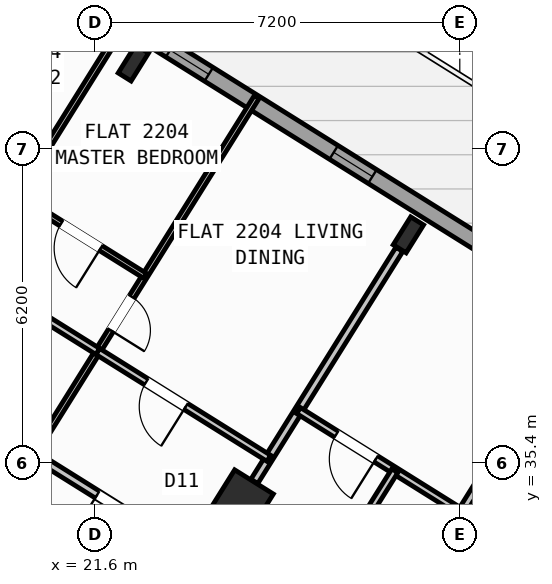
"""IFC4 building model, lengths in metres.
Left out: names, types, materials, properties, quantities, classifications, styles, units other than length and angle.
Written with IfcOpenShell. Run it as: python <this file> out.ifc"""

import sys

from ifc_helpers import new_model, si_unit, direction, frame, frame_2d, origin, origin_2d, place, context, subcontext, project, spatial, rectangle, hollow_rectangle, i_section, extrude, source, transform, mapped, element, fill, save


model = new_model("IFC4")
c1 = context("Model", 3, precision=1e-05, world=origin(), true_north=direction((0.0, 1.0)))
c2 = subcontext(c1, "Body", "Model", "MODEL_VIEW")
j1 = project(units=[si_unit("LENGTHUNIT", "METRE"), si_unit("PLANEANGLEUNIT", "RADIAN")], contexts=[c1])
p1 = place(None, origin())
s1 = spatial("IfcSite", under=j1, at=p1, CompositionType="ELEMENT")
p2 = place(p1, origin())
s2 = spatial("IfcBuilding", under=s1, at=p2, CompositionType="ELEMENT")
p3 = place(p2, frame((0.0, 0.0, 90.0)))
s3 = spatial("IfcBuildingStorey", under=s2, at=p3, CompositionType="ELEMENT", Elevation=90.0)
m1 = source(origin(), c2, "Body", "SweptSolid", [
    extrude(i_section(OverallWidth=0.3, OverallDepth=0.65, WebThickness=0.016, FlangeThickness=0.031, at=origin_2d()), origin(), (0.0, 0.0, 1.0), 3.6),
])
p4 = place(p3, frame((27.786, 39.901, 0.0), z_axis=(0.0, 0.0, 1.0), x_axis=(-0.848048096156, 0.529919264233, 0.0)))
e1 = element("IfcColumn", 1, at=p4, inside=s3, PredefinedType="COLUMN", context=c2, shape_type="MappedRepresentation", body=[
    mapped(m1, transform((0.0, 0.0, 0.0), scale=1.0)),
])
m2 = source(origin(), c2, "Body", "SweptSolid", [
    extrude(hollow_rectangle(XDim=0.9, YDim=0.9, WallThickness=0.036, at=origin_2d()), origin(), (0.0, 0.0, 1.0), 3.6),
])
p5 = place(p3, frame((24.5, 34.643, 0.0), z_axis=(0.0, 0.0, 1.0), x_axis=(-0.848048096156, 0.529919264233, 0.0)))
e2 = element("IfcColumn", 2, at=p5, inside=s3, PredefinedType="COLUMN", context=c2, shape_type="MappedRepresentation", body=[
    mapped(m2, transform((0.0, 0.0, 0.0), scale=1.0)),
])
p6 = place(p3, frame((22.358, 43.292, 0.0), z_axis=(0.0, 0.0, 1.0), x_axis=(-0.848048096156, 0.529919264233, 0.0)))
e3 = element("IfcColumn", 3, at=p6, inside=s3, PredefinedType="COLUMN", context=c2, shape_type="MappedRepresentation", body=[
    mapped(m1, transform((0.0, 0.0, 0.0), scale=1.0)),
])
p7 = place(p3, frame((17.424, 47.083, 0.0), z_axis=(0.0, 0.0, 1.0), x_axis=(0.848049927979, -0.529916332693, 0.0)))
e4 = element("IfcWall", 4, at=p7, inside=s3, PredefinedType="STANDARD", context=c2, shape_type="SweptSolid", body=[
    extrude(rectangle(XDim=29.223, YDim=0.32, at=frame_2d((14.612, 0.0))), origin(), (0.0, 0.0, 1.0), 3.35),
])
p8 = place(p7, frame((15.02, 0.0, 0.0)))
e5 = element("IfcOpeningElement", 5, at=p8, cuts=e4, PredefinedType="OPENING", context=c2, shape_type="SweptSolid", body=[
    extrude(rectangle(XDim=1.05, YDim=2.15, at=frame_2d((0.525, 1.075))), frame((0.0, 0.17, 0.0), z_axis=(0.0, -1.0, 0.0), x_axis=(1.0, 0.0, 0.0)), (0.0, 0.0, 1.0), 0.34),
])
p9 = place(p7, frame((20.869, 0.0, 0.8)))
e6 = element("IfcOpeningElement", 6, at=p9, cuts=e4, PredefinedType="OPENING", context=c2, shape_type="SweptSolid", body=[
    extrude(rectangle(XDim=2.1, YDim=1.55, at=frame_2d((1.05, 0.775))), frame((0.0, 0.17, 0.0), z_axis=(0.0, -1.0, 0.0), x_axis=(1.0, 0.0, 0.0)), (0.0, 0.0, 1.0), 0.34),
])
p10 = place(p7, frame((25.438, 0.0, 0.8)))
e7 = element("IfcOpeningElement", 7, at=p10, cuts=e4, PredefinedType="OPENING", context=c2, shape_type="SweptSolid", body=[
    extrude(rectangle(XDim=2.1, YDim=1.55, at=frame_2d((1.05, 0.775))), frame((0.0, 0.17, 0.0), z_axis=(0.0, -1.0, 0.0), x_axis=(1.0, 0.0, 0.0)), (0.0, 0.0, 1.0), 0.34),
])
p11 = place(p7, frame((10.481, 0.0, 1.0)))
e8 = element("IfcOpeningElement", 8, at=p11, cuts=e4, PredefinedType="OPENING", context=c2, shape_type="SweptSolid", body=[
    extrude(rectangle(XDim=0.9, YDim=1.25, at=frame_2d((0.45, 0.625))), frame((0.0, 0.17, 0.0), z_axis=(0.0, -1.0, 0.0), x_axis=(1.0, 0.0, 0.0)), (0.0, 0.0, 1.0), 0.34),
])
p12 = place(p7, frame((6.674, 0.0, 1.0)))
e9 = element("IfcOpeningElement", 9, at=p12, cuts=e4, PredefinedType="OPENING", context=c2, shape_type="SweptSolid", body=[
    extrude(rectangle(XDim=0.9, YDim=1.25, at=frame_2d((0.45, 0.625))), frame((0.0, 0.17, 0.0), z_axis=(0.0, -1.0, 0.0), x_axis=(1.0, 0.0, 0.0)), (0.0, 0.0, 1.0), 0.34),
])
p13 = place(p7, frame((3.694, 0.0, 1.0)))
e10 = element("IfcOpeningElement", 10, at=p13, cuts=e4, PredefinedType="OPENING", context=c2, shape_type="SweptSolid", body=[
    extrude(rectangle(XDim=0.9, YDim=1.25, at=frame_2d((0.45, 0.625))), frame((0.0, 0.17, 0.0), z_axis=(0.0, -1.0, 0.0), x_axis=(1.0, 0.0, 0.0)), (0.0, 0.0, 1.0), 0.34),
])
p14 = place(p3, frame((31.239, 38.274, 0.0), z_axis=(0.0, 0.0, 1.0), x_axis=(-0.529928058306, -0.848042600947, 0.0)))
e11 = element("IfcWall", 11, at=p14, inside=s3, PredefinedType="PARTITIONING", context=c2, shape_type="SweptSolid", body=[
    extrude(rectangle(XDim=8.05, YDim=0.16, at=frame_2d((4.025, 0.0))), origin(), (0.0, 0.0, 1.0), 3.34),
])
p15 = place(p3, frame((26.973, 31.447, 0.0), z_axis=(0.0, 0.0, 1.0), x_axis=(-0.848048310262, 0.529918921593, 0.0)))
e12 = element("IfcWall", 12, at=p15, inside=s3, PredefinedType="PARTITIONING", context=c2, shape_type="SweptSolid", body=[
    extrude(rectangle(XDim=16.73, YDim=0.16, at=frame_2d((8.365, 0.0))), origin(), (0.0, 0.0, 1.0), 3.34),
])
p16 = place(p15, frame((2.22, 0.0, 0.0)))
e13 = element("IfcOpeningElement", 13, at=p16, cuts=e12, PredefinedType="OPENING", context=c2, shape_type="SweptSolid", body=[
    extrude(rectangle(XDim=0.86, YDim=2.05, at=frame_2d((0.43, 1.025))), frame((0.0, 0.09, 0.0), z_axis=(0.0, -1.0, 0.0), x_axis=(1.0, 0.0, 0.0)), (0.0, 0.0, 1.0), 0.18),
])
p17 = place(p15, frame((5.28, 0.0, 0.0)))
e14 = element("IfcOpeningElement", 14, at=p17, cuts=e12, PredefinedType="OPENING", context=c2, shape_type="SweptSolid", body=[
    extrude(rectangle(XDim=1.0, YDim=2.1, at=frame_2d((0.5, 1.05))), frame((0.0, 0.09, 0.0), z_axis=(0.0, -1.0, 0.0), x_axis=(1.0, 0.0, 0.0)), (0.0, 0.0, 1.0), 0.18),
])
p18 = place(p3, frame((25.807, 29.582, 0.0), z_axis=(0.0, 0.0, 1.0), x_axis=(-0.848052408131, 0.529912363569, 0.0)))
e15 = element("IfcWall", 15, at=p18, inside=s3, PredefinedType="PARTITIONING", context=c2, shape_type="SweptSolid", body=[
    extrude(rectangle(XDim=16.73, YDim=0.16, at=frame_2d((8.365, 0.0))), origin(), (0.0, 0.0, 1.0), 3.34),
])
p19 = place(p18, frame((2.22, 0.0, 0.0)))
e16 = element("IfcOpeningElement", 16, at=p19, cuts=e15, PredefinedType="OPENING", context=c2, shape_type="SweptSolid", body=[
    extrude(rectangle(XDim=0.86, YDim=2.05, at=frame_2d((0.43, 1.025))), frame((0.0, 0.09, 0.0), z_axis=(0.0, -1.0, 0.0), x_axis=(1.0, 0.0, 0.0)), (0.0, 0.0, 1.0), 0.18),
])
p20 = place(p18, frame((14.013, 0.0, 0.0)))
e17 = element("IfcOpeningElement", 17, at=p20, cuts=e15, PredefinedType="OPENING", context=c2, shape_type="SweptSolid", body=[
    extrude(rectangle(XDim=1.0, YDim=2.1, at=frame_2d((0.5, 1.05))), frame((0.0, 0.09, 0.0), z_axis=(0.0, -1.0, 0.0), x_axis=(1.0, 0.0, 0.0)), (0.0, 0.0, 1.0), 0.18),
])
p21 = place(p3, frame((27.607, 39.615, 0.0), z_axis=(0.0, 0.0, 1.0), x_axis=(-0.529913610495, -0.848051628978, 0.0)))
e18 = element("IfcWall", 18, at=p21, inside=s3, PredefinedType="PARTITIONING", context=c2, shape_type="SweptSolid", body=[
    extrude(rectangle(XDim=5.401, YDim=0.16, at=frame_2d((2.7, 0.0))), origin(), (0.0, 0.0, 1.0), 2.775),
])
p22 = place(p3, frame((28.833, 34.424, 0.0), z_axis=(0.0, 0.0, 1.0), x_axis=(-0.848059820872, 0.529900500304, 0.0)))
e19 = element("IfcWall", 19, at=p22, inside=s3, PredefinedType="PLUMBINGWALL", context=c2, shape_type="SweptSolid", body=[
    extrude(rectangle(XDim=3.79, YDim=0.14, at=frame_2d((1.895, 0.0))), origin(), (0.0, 0.0, 1.0), 3.34),
])
p23 = place(p22, frame((1.99, 0.0, 0.0)))
e20 = element("IfcOpeningElement", 20, at=p23, cuts=e19, PredefinedType="OPENING", context=c2, shape_type="SweptSolid", body=[
    extrude(rectangle(XDim=0.92, YDim=2.08, at=frame_2d((0.46, 1.04))), frame((0.0, 0.08, 0.0), z_axis=(0.0, -1.0, 0.0), x_axis=(1.0, 0.0, 0.0)), (0.0, 0.0, 1.0), 0.16),
])
p24 = place(p3, frame((27.518, 35.245, 0.0), z_axis=(0.0, 0.0, 1.0), x_axis=(-0.529948921118, -0.848029563757, 0.0)))
e21 = element("IfcWall", 21, at=p24, inside=s3, PredefinedType="PLUMBINGWALL", context=c2, shape_type="SweptSolid", body=[
    extrude(rectangle(XDim=3.51, YDim=0.14, at=frame_2d((1.755, 0.0))), origin(), (0.0, 0.0, 1.0), 2.995),
])
p25 = place(p24, frame((1.365, 0.0, 0.0)))
e22 = element("IfcOpeningElement", 22, at=p25, cuts=e21, PredefinedType="OPENING", context=c2, shape_type="SweptSolid", body=[
    extrude(rectangle(XDim=0.78, YDim=2.05, at=frame_2d((0.39, 1.025))), frame((0.0, 0.08, 0.0), z_axis=(0.0, -1.0, 0.0), x_axis=(1.0, 0.0, 0.0)), (0.0, 0.0, 1.0), 0.16),
])
p26 = place(p3, frame((24.792, 42.62, 0.0), z_axis=(0.0, 0.0, 1.0), x_axis=(-0.529925083182, -0.848044460046, 0.0)))
e23 = element("IfcWall", 23, at=p26, inside=s3, PredefinedType="PARTITIONING", context=c2, shape_type="SweptSolid", body=[
    extrude(rectangle(XDim=8.32, YDim=0.11, at=frame_2d((4.16, 0.0))), origin(), (0.0, 0.0, 1.0), 3.34),
])
p27 = place(p26, frame((4.65, 0.0, 0.0)))
e24 = element("IfcOpeningElement", 24, at=p27, cuts=e23, PredefinedType="OPENING", context=c2, shape_type="SweptSolid", body=[
    extrude(rectangle(XDim=0.78, YDim=2.05, at=frame_2d((0.39, 1.025))), frame((0.0, 0.065, 0.0), z_axis=(0.0, -1.0, 0.0), x_axis=(1.0, 0.0, 0.0)), (0.0, 0.0, 1.0), 0.13),
])
p28 = place(p3, frame((25.03, 35.491, 0.0), z_axis=(0.0, 0.0, 1.0), x_axis=(-0.848070667369, 0.52988314103, 0.0)))
e25 = element("IfcWall", 25, at=p28, inside=s3, PredefinedType="PLUMBINGWALL", context=c2, shape_type="SweptSolid", body=[
    extrude(rectangle(XDim=3.98, YDim=0.14, at=frame_2d((1.99, 0.0))), origin(), (0.0, 0.0, 1.0), 3.34),
])
p29 = place(p28, frame((1.93, 0.0, 0.0)))
e26 = element("IfcOpeningElement", 26, at=p29, cuts=e25, PredefinedType="OPENING", context=c2, shape_type="SweptSolid", body=[
    extrude(rectangle(XDim=0.92, YDim=2.08, at=frame_2d((0.46, 1.04))), frame((0.0, 0.08, 0.0), z_axis=(0.0, -1.0, 0.0), x_axis=(1.0, 0.0, 0.0)), (0.0, 0.0, 1.0), 0.16),
])
p30 = place(p3, frame((21.655, 37.6, 0.0), z_axis=(0.0, 0.0, 1.0), x_axis=(-0.848044326704, 0.52992529657, 0.0)))
e27 = element("IfcWall", 27, at=p30, inside=s3, PredefinedType="PLUMBINGWALL", context=c2, shape_type="SweptSolid", body=[
    extrude(rectangle(XDim=8.94, YDim=0.14, at=frame_2d((4.47, 0.0))), origin(), (0.0, 0.0, 1.0), 3.34),
])
p31 = place(p30, frame((2.972, 0.0, 0.0)))
e28 = element("IfcOpeningElement", 28, at=p31, cuts=e27, PredefinedType="OPENING", context=c2, shape_type="SweptSolid", body=[
    extrude(rectangle(XDim=0.78, YDim=2.05, at=frame_2d((0.39, 1.025))), frame((0.0, 0.08, 0.0), z_axis=(0.0, -1.0, 0.0), x_axis=(1.0, 0.0, 0.0)), (0.0, 0.0, 1.0), 0.16),
])
p32 = place(p30, frame((6.843, 0.0, 0.0)))
e29 = element("IfcOpeningElement", 29, at=p32, cuts=e27, PredefinedType="OPENING", context=c2, shape_type="SweptSolid", body=[
    extrude(rectangle(XDim=0.78, YDim=2.05, at=frame_2d((0.39, 1.025))), frame((0.0, 0.08, 0.0), z_axis=(0.0, -1.0, 0.0), x_axis=(1.0, 0.0, 0.0)), (0.0, 0.0, 1.0), 0.16),
])
p33 = place(p3, frame((22.588, 39.093, 0.0), z_axis=(0.0, 0.0, 1.0), x_axis=(-0.848044326704, 0.52992529657, 0.0)))
e30 = element("IfcWall", 30, at=p33, inside=s3, PredefinedType="PARTITIONING", context=c2, shape_type="SweptSolid", body=[
    extrude(rectangle(XDim=8.94, YDim=0.11, at=frame_2d((4.47, 0.0))), origin(), (0.0, 0.0, 1.0), 3.34),
])
p34 = place(p33, frame((1.03, 0.0, 0.0)))
e31 = element("IfcOpeningElement", 31, at=p34, cuts=e30, PredefinedType="OPENING", context=c2, shape_type="SweptSolid", body=[
    extrude(rectangle(XDim=0.92, YDim=2.08, at=frame_2d((0.46, 1.04))), frame((0.0, 0.065, 0.0), z_axis=(0.0, -1.0, 0.0), x_axis=(1.0, 0.0, 0.0)), (0.0, 0.0, 1.0), 0.13),
])
p35 = place(p33, frame((4.01, 0.0, 0.0)))
e32 = element("IfcOpeningElement", 32, at=p35, cuts=e30, PredefinedType="OPENING", context=c2, shape_type="SweptSolid", body=[
    extrude(rectangle(XDim=0.92, YDim=2.08, at=frame_2d((0.46, 1.04))), frame((0.0, 0.065, 0.0), z_axis=(0.0, -1.0, 0.0), x_axis=(1.0, 0.0, 0.0)), (0.0, 0.0, 1.0), 0.13),
])
p36 = place(p33, frame((6.99, 0.0, 0.0)))
e33 = element("IfcOpeningElement", 33, at=p36, cuts=e30, PredefinedType="OPENING", context=c2, shape_type="SweptSolid", body=[
    extrude(rectangle(XDim=0.92, YDim=2.08, at=frame_2d((0.46, 1.04))), frame((0.0, 0.065, 0.0), z_axis=(0.0, -1.0, 0.0), x_axis=(1.0, 0.0, 0.0)), (0.0, 0.0, 1.0), 0.13),
])
p37 = place(p3, frame((22.265, 44.199, 0.0), z_axis=(0.0, 0.0, 1.0), x_axis=(-0.529946186362, -0.848031272749, 0.0)))
e34 = element("IfcWall", 34, at=p37, inside=s3, PredefinedType="PARTITIONING", context=c2, shape_type="SweptSolid", body=[
    extrude(rectangle(XDim=4.16, YDim=0.11, at=frame_2d((2.08, 0.0))), origin(), (0.0, 0.0, 1.0), 3.34),
])
m3 = source(origin(), c2, "Body", "SweptSolid", [
    extrude(rectangle(XDim=0.9, YDim=1.25, at=frame_2d((0.45, 0.625))), frame((0.0, 0.03, 0.0), z_axis=(0.0, -1.0, 0.0), x_axis=(1.0, 0.0, 0.0)), (0.0, 0.0, 1.0), 0.06),
])
p38 = place(p11, origin())
e35 = element("IfcWindow", 35, at=p38, inside=s3, PartitioningType="SINGLE_PANEL", PredefinedType="WINDOW", context=c2, shape_type="MappedRepresentation", body=[
    mapped(m3, transform((0.0, 0.0, 0.0), scale=1.0)),
])
fill(e8, e35)
p39 = place(p12, origin())
e36 = element("IfcWindow", 36, at=p39, inside=s3, PartitioningType="SINGLE_PANEL", PredefinedType="WINDOW", context=c2, shape_type="MappedRepresentation", body=[
    mapped(m3, transform((0.0, 0.0, 0.0), scale=1.0)),
])
fill(e9, e36)
m4 = source(origin(), c2, "Body", "SweptSolid", [
    extrude(rectangle(XDim=0.92, YDim=2.08, at=frame_2d((0.46, 1.04))), frame((0.0, 0.025, 0.0), z_axis=(0.0, -1.0, 0.0), x_axis=(1.0, 0.0, 0.0)), (0.0, 0.0, 1.0), 0.05),
])
p40 = place(p23, origin())
e37 = element("IfcDoor", 37, at=p40, inside=s3, OperationType="SINGLE_SWING_LEFT", PredefinedType="DOOR", context=c2, shape_type="MappedRepresentation", body=[
    mapped(m4, transform((0.0, 0.0, 0.0), scale=1.0)),
])
fill(e20, e37)
m5 = source(origin(), c2, "Body", "SweptSolid", [
    extrude(rectangle(XDim=1.0, YDim=2.1, at=frame_2d((0.5, 1.05))), frame((0.0, 0.025, 0.0), z_axis=(0.0, -1.0, 0.0), x_axis=(1.0, 0.0, 0.0)), (0.0, 0.0, 1.0), 0.05),
])
p41 = place(p17, origin())
e38 = element("IfcDoor", 38, at=p41, inside=s3, OperationType="SINGLE_SWING_RIGHT", PredefinedType="DOOR", context=c2, shape_type="MappedRepresentation", body=[
    mapped(m5, transform((0.0, 0.0, 0.0), scale=1.0)),
])
fill(e14, e38)
p42 = place(p29, origin())
e39 = element("IfcDoor", 39, at=p42, inside=s3, OperationType="SINGLE_SWING_LEFT", PredefinedType="DOOR", context=c2, shape_type="MappedRepresentation", body=[
    mapped(m4, transform((0.0, 0.0, 0.0), scale=1.0)),
])
fill(e26, e39)
m6 = source(origin(), c2, "Body", "SweptSolid", [
    extrude(rectangle(XDim=0.78, YDim=2.05, at=frame_2d((0.39, 1.025))), frame((0.0, 0.025, 0.0), z_axis=(0.0, -1.0, 0.0), x_axis=(1.0, 0.0, 0.0)), (0.0, 0.0, 1.0), 0.05),
])
p43 = place(p27, origin())
e40 = element("IfcDoor", 40, at=p43, inside=s3, OperationType="SINGLE_SWING_RIGHT", PredefinedType="DOOR", context=c2, shape_type="MappedRepresentation", body=[
    mapped(m6, transform((0.0, 0.0, 0.0), scale=1.0)),
])
fill(e24, e40)
p44 = place(p34, origin())
e41 = element("IfcDoor", 41, at=p44, inside=s3, OperationType="SINGLE_SWING_LEFT", PredefinedType="DOOR", context=c2, shape_type="MappedRepresentation", body=[
    mapped(m4, transform((0.0, 0.0, 0.0), scale=1.0)),
])
fill(e31, e41)
save(model, sys.argv[1])
